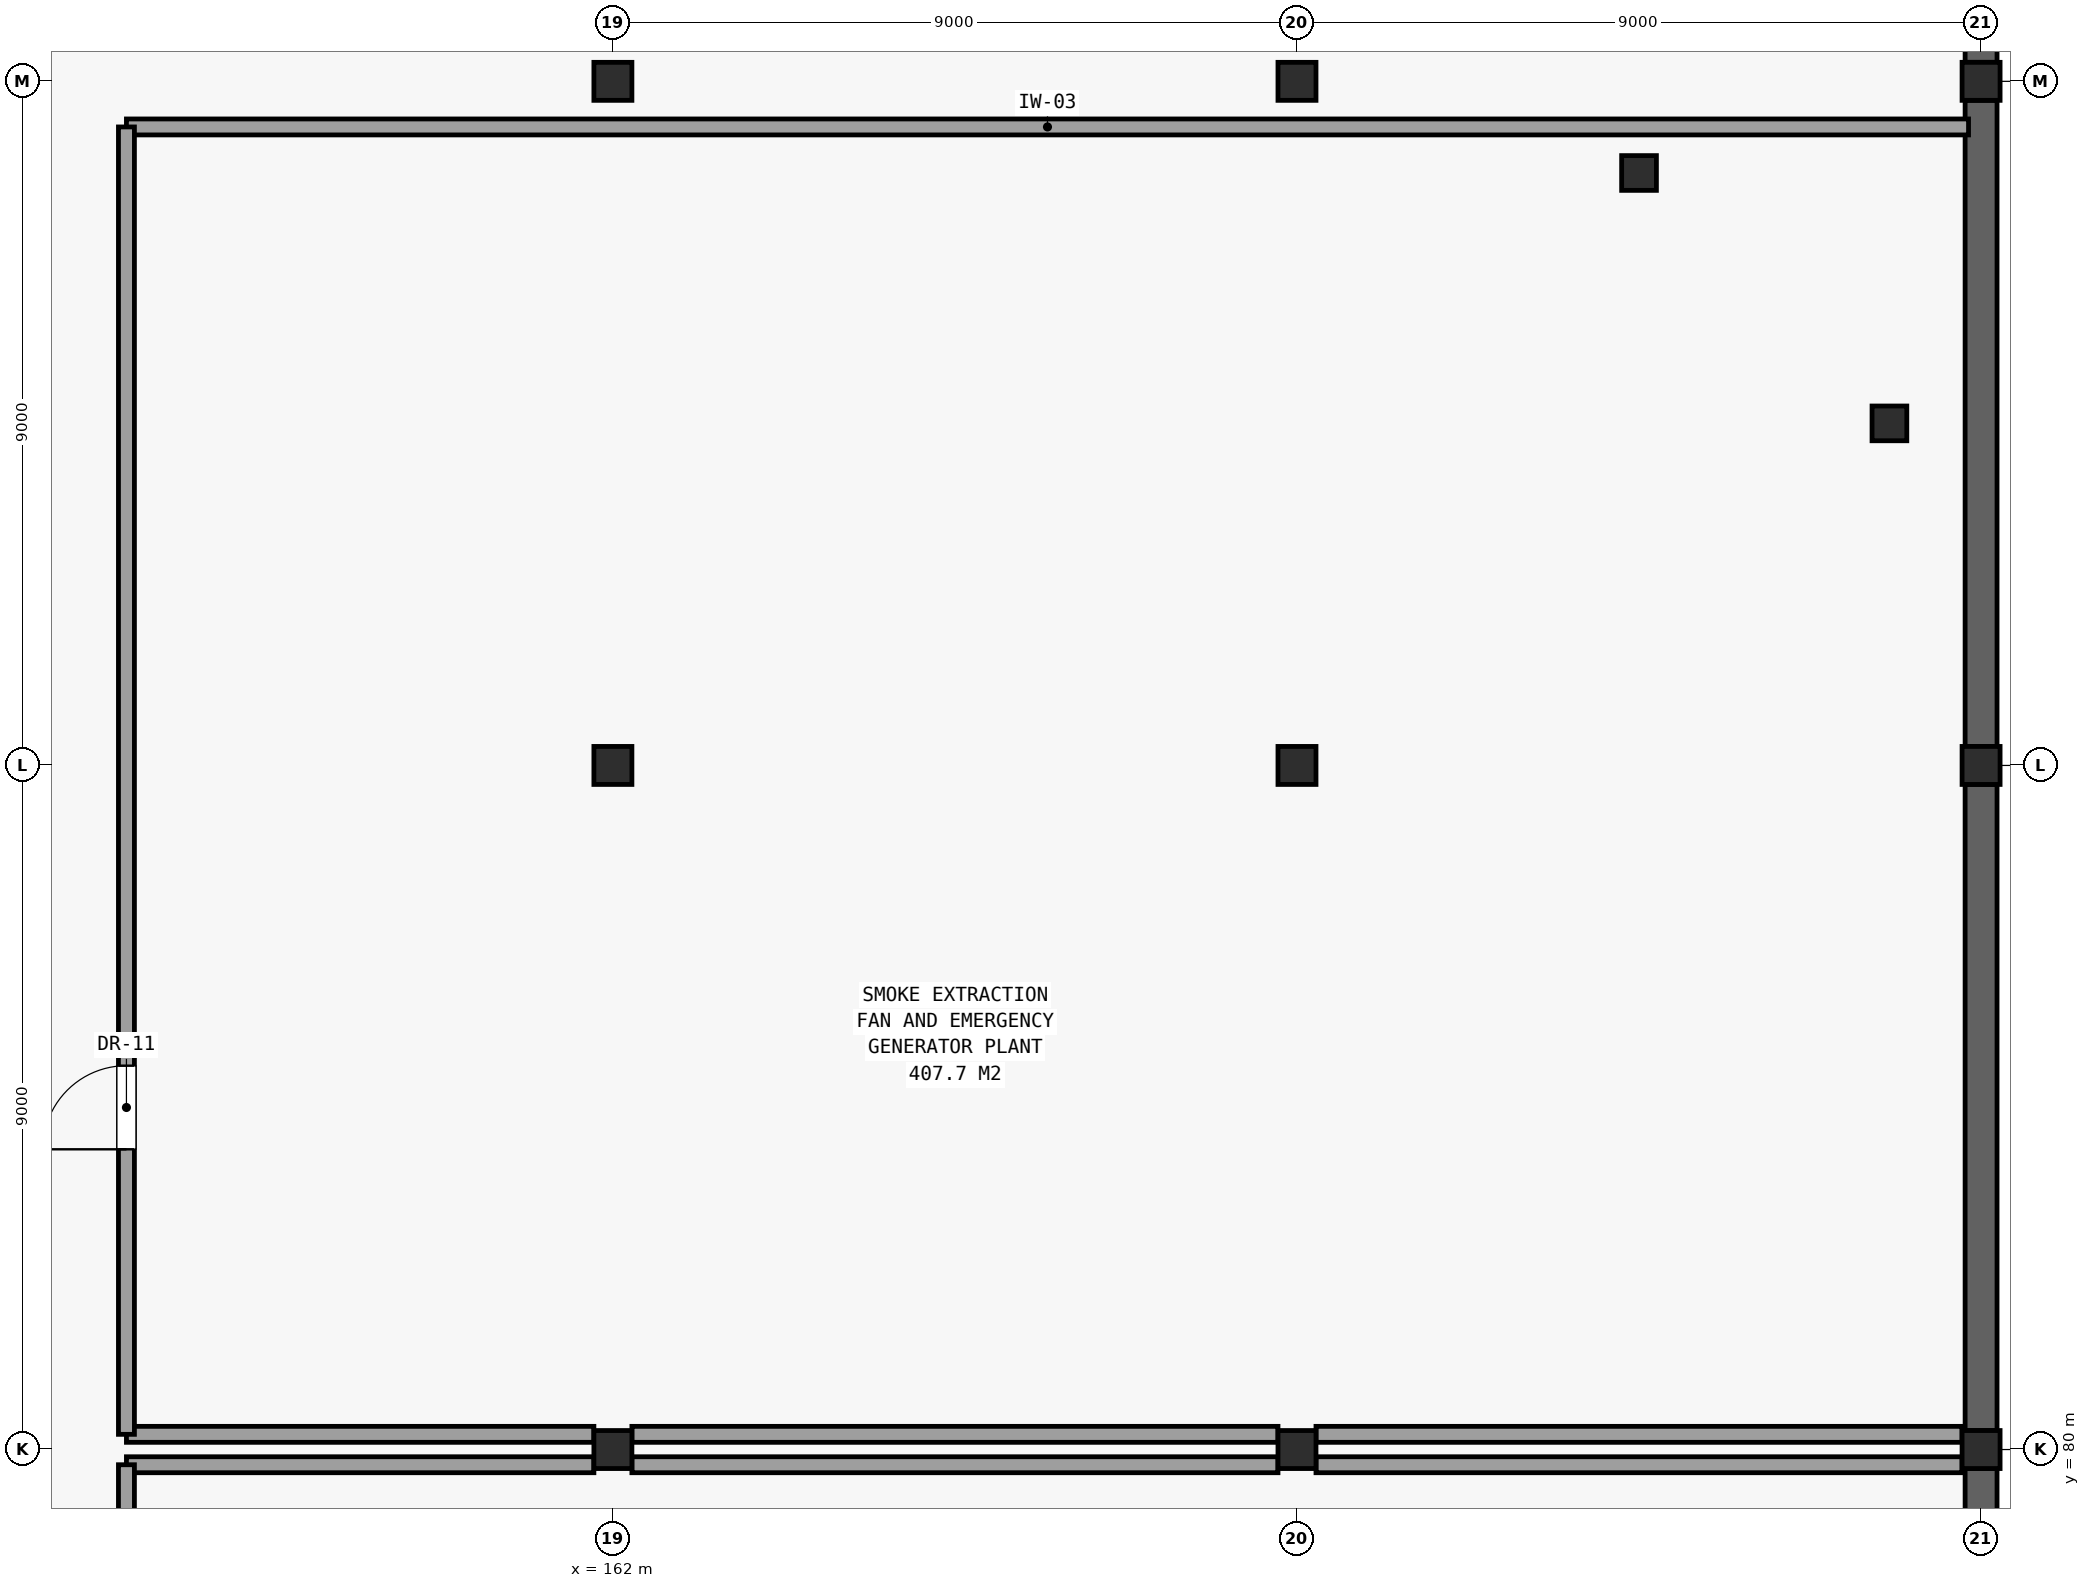
"""IFC4 building model, lengths in metres.
Left out: names, types, materials, properties, quantities, classifications, styles, units other than length and angle.
Written with IfcOpenShell. Run it as: python <this file> out.ifc"""

import sys

from ifc_helpers import new_model, si_unit, direction, frame, frame_2d, origin, origin_2d, place, context, subcontext, project, spatial, rectangle, hollow_rectangle, hollow_circle, extrude, element, fill, save


model = new_model("IFC4")
c1 = context("Model", 3, precision=1e-05, world=origin(), true_north=direction((0.0, 1.0)))
c2 = subcontext(c1, "Body", "Model", "MODEL_VIEW")
j1 = project(units=[si_unit("LENGTHUNIT", "METRE"), si_unit("PLANEANGLEUNIT", "RADIAN")], contexts=[c1])
p1 = place(None, origin())
s1 = spatial("IfcSite", under=j1, at=p1, CompositionType="ELEMENT")
p2 = place(p1, origin())
s2 = spatial("IfcBuilding", under=s1, at=p2, CompositionType="ELEMENT")
p3 = place(p2, frame((0.0, 0.0, -4.8)))
s3 = spatial("IfcBuildingStorey", under=s2, at=p3, CompositionType="ELEMENT", Elevation=-4.8)
for number, where, z_axis, x_axis in (
    (1, (162.0, 80.0, 0.0), (0.0, 0.0, 1.0), (1.0, 0.0, 0.0)),
    (2, (162.0, 89.0, 0.0), (0.0, 0.0, 1.0), (1.0, 0.0, 0.0)),
    (3, (162.0, 98.0, 0.0), (0.0, 0.0, 1.0), (1.0, 0.0, 0.0)),
    (4, (171.0, 80.0, 0.0), (0.0, 0.0, 1.0), (1.0, 0.0, 0.0)),
    (5, (171.0, 89.0, 0.0), (0.0, 0.0, 1.0), (1.0, 0.0, 0.0)),
    (6, (171.0, 98.0, 0.0), (0.0, 0.0, 1.0), (1.0, 0.0, 0.0)),
):
    element("IfcColumn", number, at=place(p3, frame(where, z_axis=z_axis, x_axis=x_axis)), inside=s3, PredefinedType="COLUMN", context=c2, shape_type="SweptSolid", body=[
        extrude(hollow_rectangle(XDim=0.5, YDim=0.5, WallThickness=0.025, at=origin_2d()), origin(), (0.0, 0.0, 1.0), 4.8),
    ])
for number, where, z_axis, x_axis in (
    (7, (175.5, 96.794, 0.0), (0.0, 0.0, 1.0), (1.0, 0.0, 0.0)),
    (8, (178.794, 93.5, 0.0), (0.0, 0.0, 1.0), (1.0, 0.0, 0.0)),
):
    element("IfcColumn", number, at=place(p3, frame(where, z_axis=z_axis, x_axis=x_axis)), inside=s3, PredefinedType="COLUMN", context=c2, shape_type="SweptSolid", body=[
        extrude(hollow_circle(Radius=0.229, WallThickness=0.016, at=origin_2d()), origin(), (0.0, 0.0, 1.0), 4.8),
    ])
for number, where, z_axis, x_axis in (
    (9, (180.0, 80.0, 0.0), (0.0, 0.0, 1.0), (1.0, 0.0, 0.0)),
    (10, (180.0, 89.0, 0.0), (0.0, 0.0, 1.0), (1.0, 0.0, 0.0)),
    (11, (180.0, 98.0, 0.0), (0.0, 0.0, 1.0), (1.0, 0.0, 0.0)),
):
    element("IfcColumn", number, at=place(p3, frame(where, z_axis=z_axis, x_axis=x_axis)), inside=s3, PredefinedType="COLUMN", context=c2, shape_type="SweptSolid", body=[
        extrude(hollow_rectangle(XDim=0.5, YDim=0.5, WallThickness=0.025, at=origin_2d()), origin(), (0.0, 0.0, 1.0), 4.8),
    ])
for number, where, z_axis, x_axis in (
    (12, (180.0, 71.25, 0.0), (0.0, 0.0, 1.0), (0.0, 1.0, 0.0)),
    (13, (180.0, 80.25, 0.0), (0.0, 0.0, 1.0), (0.0, 1.0, 0.0)),
    (14, (180.0, 89.25, 0.0), (0.0, 0.0, 1.0), (0.0, 1.0, 0.0)),
):
    element("IfcWall", number, at=place(p3, frame(where, z_axis=z_axis, x_axis=x_axis)), inside=s3, PredefinedType="USERDEFINED", context=c2, shape_type="SweptSolid", body=[
        extrude(rectangle(XDim=8.5, YDim=0.42, at=frame_2d((4.25, 0.0))), origin(), (0.0, 0.0, 1.0), 3.72),
    ])
p4 = place(p3, frame((180.0, 98.25, 0.0), z_axis=(0.0, 0.0, 1.0), x_axis=(0.0, 1.0, 0.0)))
e15 = element("IfcWall", 15, at=p4, inside=s3, PredefinedType="USERDEFINED", context=c2, shape_type="SweptSolid", body=[
    extrude(rectangle(XDim=9.56, YDim=0.42, at=frame_2d((4.78, 0.0))), origin(), (0.0, 0.0, 1.0), 4.52),
])
p5 = place(p3, frame((155.6, 79.8, 0.0), z_axis=(0.0, 0.0, 1.0), x_axis=(1.0, 0.0, 0.0)))
e16 = element("IfcWall", 16, at=p5, inside=s3, PredefinedType="PARTITIONING", context=c2, shape_type="SweptSolid", body=[
    extrude(rectangle(XDim=6.15, YDim=0.21, at=frame_2d((3.075, 0.0))), origin(), (0.0, 0.0, 1.0), 3.72),
])
for number, where, z_axis, x_axis in (
    (17, (162.25, 79.8, 0.0), (0.0, 0.0, 1.0), (1.0, 0.0, 0.0)),
    (18, (171.25, 79.8, 0.0), (0.0, 0.0, 1.0), (1.0, 0.0, 0.0)),
):
    element("IfcWall", number, at=place(p3, frame(where, z_axis=z_axis, x_axis=x_axis)), inside=s3, PredefinedType="PARTITIONING", context=c2, shape_type="SweptSolid", body=[
        extrude(rectangle(XDim=8.5, YDim=0.21, at=frame_2d((4.25, 0.0))), origin(), (0.0, 0.0, 1.0), 3.72),
    ])
p6 = place(p3, frame((155.6, 62.2, 0.0), z_axis=(0.0, 0.0, 1.0), x_axis=(0.0, 1.0, 0.0)))
e19 = element("IfcWall", 19, at=p6, inside=s3, PredefinedType="PARTITIONING", context=c2, shape_type="SweptSolid", body=[
    extrude(rectangle(XDim=17.6, YDim=0.21, at=frame_2d((8.8, 0.0))), origin(), (0.0, 0.0, 1.0), 3.82),
])
p7 = place(p6, frame((12.6, 0.0, 0.0)))
e20 = element("IfcOpeningElement", 20, at=p7, cuts=e19, PredefinedType="OPENING", context=c2, shape_type="SweptSolid", body=[
    extrude(rectangle(XDim=1.4, YDim=2.2, at=frame_2d((0.7, 1.1))), frame((0.0, 0.116, 0.0), z_axis=(0.0, -1.0, 0.0), x_axis=(1.0, 0.0, 0.0)), (0.0, 0.0, 1.0), 0.232),
])
p8 = place(p3, frame((155.6, 80.2, 0.0), z_axis=(0.0, 0.0, 1.0), x_axis=(1.0, 0.0, 0.0)))
e21 = element("IfcWall", 21, at=p8, inside=s3, PredefinedType="PARTITIONING", context=c2, shape_type="SweptSolid", body=[
    extrude(rectangle(XDim=6.15, YDim=0.21, at=frame_2d((3.075, 0.0))), origin(), (0.0, 0.0, 1.0), 3.72),
])
for number, where, z_axis, x_axis in (
    (22, (162.25, 80.2, 0.0), (0.0, 0.0, 1.0), (1.0, 0.0, 0.0)),
    (23, (171.25, 80.2, 0.0), (0.0, 0.0, 1.0), (1.0, 0.0, 0.0)),
):
    element("IfcWall", number, at=place(p3, frame(where, z_axis=z_axis, x_axis=x_axis)), inside=s3, PredefinedType="PARTITIONING", context=c2, shape_type="SweptSolid", body=[
        extrude(rectangle(XDim=8.5, YDim=0.21, at=frame_2d((4.25, 0.0))), origin(), (0.0, 0.0, 1.0), 3.72),
    ])
p9 = place(p3, frame((155.6, 97.4, 0.0), z_axis=(0.0, 0.0, 1.0), x_axis=(1.0, 0.0, 0.0)))
e24 = element("IfcWall", 24, at=p9, inside=s3, PredefinedType="PARTITIONING", context=c2, shape_type="SweptSolid", body=[
    extrude(rectangle(XDim=24.235, YDim=0.21, at=frame_2d((12.117, 0.0))), origin(), (0.0, 0.0, 1.0), 3.72),
])
p10 = place(p3, frame((155.6, 80.2, 0.0), z_axis=(0.0, 0.0, 1.0), x_axis=(0.0, 1.0, 0.0)))
e25 = element("IfcWall", 25, at=p10, inside=s3, PredefinedType="PARTITIONING", context=c2, shape_type="SweptSolid", body=[
    extrude(rectangle(XDim=17.2, YDim=0.21, at=frame_2d((8.6, 0.0))), origin(), (0.0, 0.0, 1.0), 3.82),
])
p11 = place(p10, frame((3.75, 0.0, 0.0)))
e26 = element("IfcOpeningElement", 26, at=p11, cuts=e25, PredefinedType="OPENING", context=c2, shape_type="SweptSolid", body=[
    extrude(rectangle(XDim=1.1, YDim=2.15, at=frame_2d((0.55, 1.075))), frame((0.0, 0.116, 0.0), z_axis=(0.0, -1.0, 0.0), x_axis=(1.0, 0.0, 0.0)), (0.0, 0.0, 1.0), 0.232),
])
p12 = place(p11, origin())
e27 = element("IfcDoor", 27, at=p12, inside=s3, OperationType="SINGLE_SWING_LEFT", PredefinedType="DOOR", context=c2, shape_type="SweptSolid", body=[
    extrude(rectangle(XDim=1.1, YDim=2.15, at=frame_2d((0.55, 1.075))), frame((0.0, 0.025, 0.0), z_axis=(0.0, -1.0, 0.0), x_axis=(1.0, 0.0, 0.0)), (0.0, 0.0, 1.0), 0.05),
])
fill(e26, e27)
save(model, sys.argv[1])
